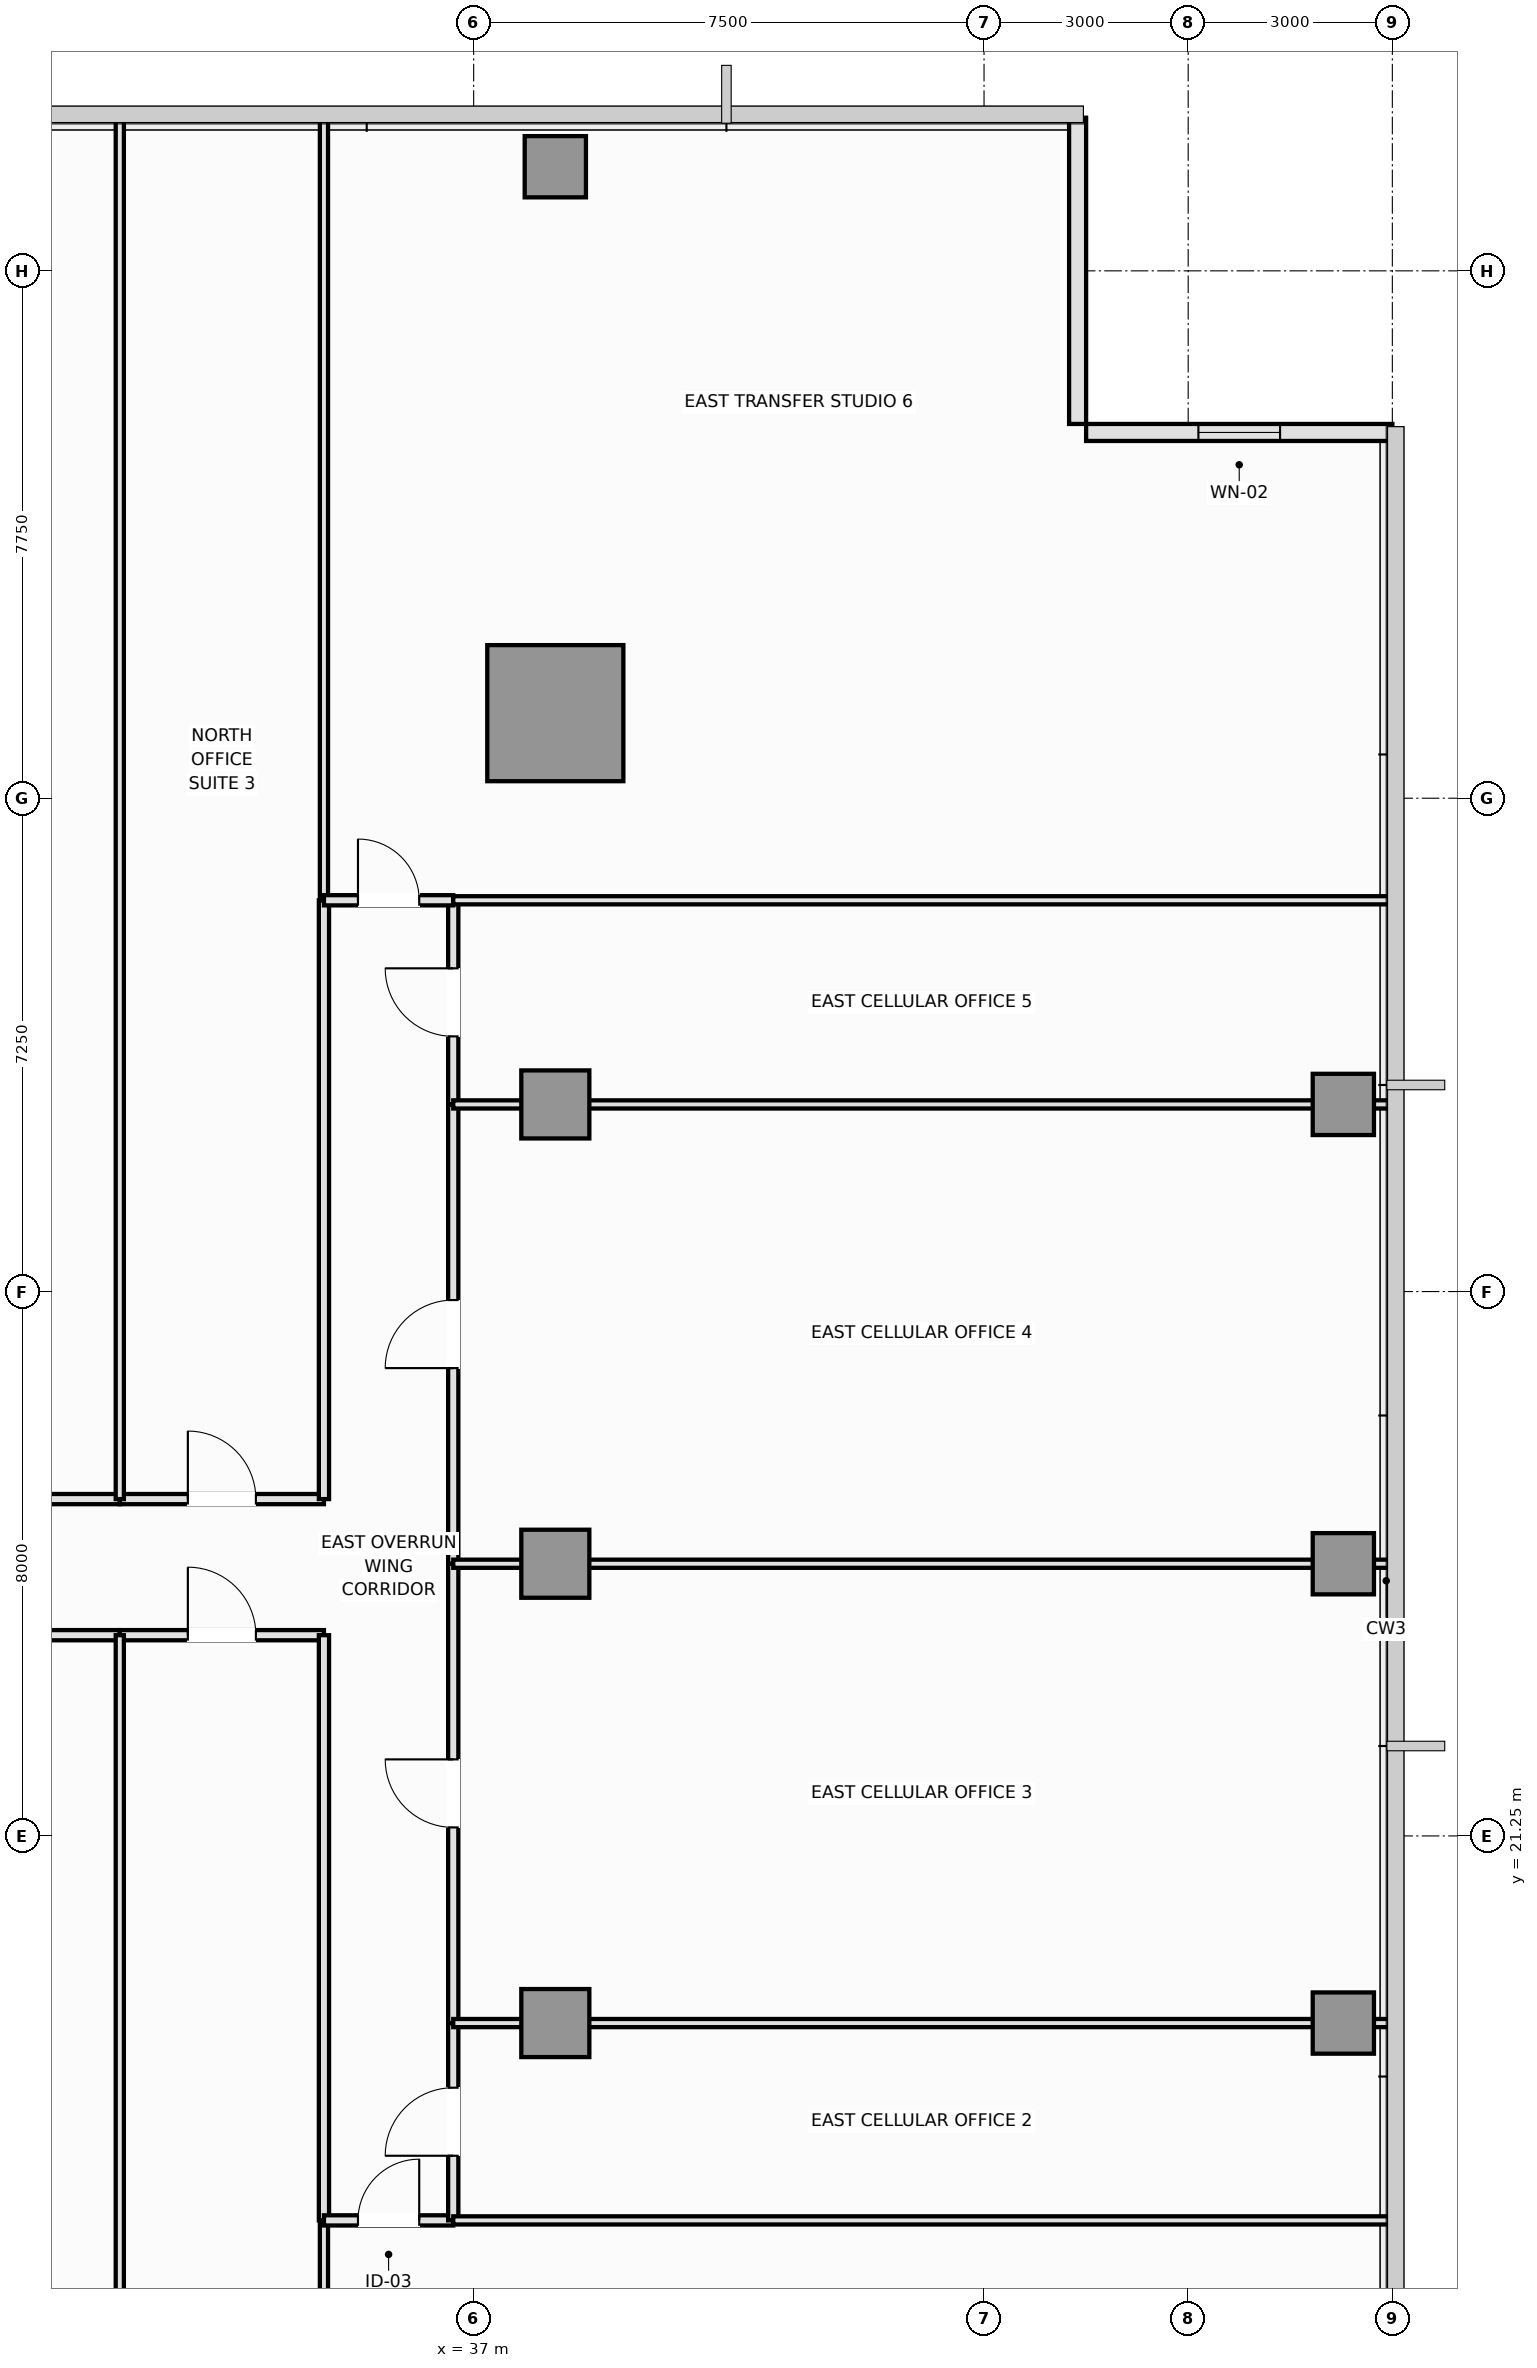
"""IFC4 building model, lengths in metres.
Left out: names, types, materials, properties, quantities, classifications, styles, units other than length and angle.
Written with IfcOpenShell. Run it as: python <this file> out.ifc"""

import sys

from ifc_helpers import new_model, si_unit, direction, frame, frame_2d, origin, origin_2d, place, context, subcontext, project, spatial, rectangle, extrude, element, fill, save


model = new_model("IFC4")
c1 = context("Model", 3, precision=1e-05, world=origin(), true_north=direction((0.0, 1.0)))
c2 = subcontext(c1, "Body", "Model", "MODEL_VIEW")
j1 = project(units=[si_unit("LENGTHUNIT", "METRE"), si_unit("PLANEANGLEUNIT", "RADIAN")], contexts=[c1])
p1 = place(None, origin())
s1 = spatial("IfcSite", under=j1, at=p1, CompositionType="ELEMENT")
p2 = place(p1, origin())
s2 = spatial("IfcBuilding", under=s1, at=p2, CompositionType="ELEMENT")
p3 = place(p2, frame((0.0, 0.0, 102.25)))
s3 = spatial("IfcBuildingStorey", under=s2, at=p3, CompositionType="ELEMENT", Elevation=102.25)
p4 = place(p3, frame((38.2, 37.75, 0.0), z_axis=(0.0, 0.0, 1.0), x_axis=(1.0, 0.0, 0.0)))
e1 = element("IfcColumn", 1, at=p4, inside=s3, PredefinedType="COLUMN", context=c2, shape_type="SweptSolid", body=[
    extrude(rectangle(XDim=2.0, YDim=2.0, at=origin_2d()), origin(), (0.0, 0.0, 1.0), 3.55),
])
for number, where, z_axis, x_axis in (
    (2, (38.2, 18.5, 0.0), (0.0, 0.0, 1.0), (1.0, 0.0, 0.0)),
    (3, (38.2, 25.25, 0.0), (0.0, 0.0, 1.0), (1.0, 0.0, 0.0)),
    (4, (38.2, 32.0, 0.0), (0.0, 0.0, 1.0), (1.0, 0.0, 0.0)),
):
    element("IfcColumn", number, at=place(p3, frame(where, z_axis=z_axis, x_axis=x_axis)), inside=s3, PredefinedType="COLUMN", context=c2, shape_type="SweptSolid", body=[
        extrude(rectangle(XDim=1.0, YDim=1.0, at=origin_2d()), origin(), (0.0, 0.0, 1.0), 3.55),
    ])
for number, where, z_axis, x_axis in (
    (5, (49.78, 18.5, 0.0), (0.0, 0.0, 1.0), (1.0, 0.0, 0.0)),
    (6, (49.78, 25.25, 0.0), (0.0, 0.0, 1.0), (1.0, 0.0, 0.0)),
    (7, (49.78, 32.0, 0.0), (0.0, 0.0, 1.0), (1.0, 0.0, 0.0)),
    (8, (38.2, 45.78, 0.0), (0.0, 0.0, 1.0), (1.0, 0.0, 0.0)),
):
    element("IfcColumn", number, at=place(p3, frame(where, z_axis=z_axis, x_axis=x_axis)), inside=s3, PredefinedType="COLUMN", context=c2, shape_type="SweptSolid", body=[
        extrude(rectangle(XDim=0.9, YDim=0.9, at=origin_2d()), origin(), (0.0, 0.0, 1.0), 3.55),
    ])
p5 = place(p3, frame((50.5, 41.875, 0.0), z_axis=(0.0, 0.0, 1.0), x_axis=(-1.0, 0.0, 0.0)))
e9 = element("IfcWall", 9, at=p5, inside=s3, PredefinedType="SOLIDWALL", context=c2, shape_type="SweptSolid", body=[
    extrude(rectangle(XDim=4.5, YDim=0.25, at=frame_2d((2.25, 0.0))), origin(), (0.0, 0.0, 1.0), 3.37),
])
p6 = place(p5, frame((1.65, 0.0, 0.9)))
e10 = element("IfcOpeningElement", 10, at=p6, cuts=e9, PredefinedType="OPENING", context=c2, shape_type="SweptSolid", body=[
    extrude(rectangle(XDim=1.2, YDim=1.8, at=frame_2d((0.6, 0.9))), frame((0.0, 0.135, 0.0), z_axis=(0.0, -1.0, 0.0), x_axis=(1.0, 0.0, 0.0)), (0.0, 0.0, 1.0), 0.27),
])
p7 = place(p3, frame((45.875, 42.0, 0.0), z_axis=(0.0, 0.0, 1.0), x_axis=(0.0, 1.0, 0.0)))
e11 = element("IfcWall", 11, at=p7, inside=s3, PredefinedType="SOLIDWALL", context=c2, shape_type="SweptSolid", body=[
    extrude(rectangle(XDim=4.5, YDim=0.25, at=frame_2d((2.25, 0.0))), origin(), (0.0, 0.0, 1.0), 3.37),
])
p8 = place(p3, frame((27.5, 24.2, 0.0), z_axis=(0.0, 0.0, 1.0), x_axis=(1.0, 0.0, 0.0)))
e12 = element("IfcWall", 12, at=p8, inside=s3, PredefinedType="PARTITIONING", context=c2, shape_type="SweptSolid", body=[
    extrude(rectangle(XDim=4.3, YDim=0.15, at=frame_2d((2.15, 0.0))), origin(), (0.0, 0.0, 1.0), 3.37),
])
p9 = place(p8, frame((1.65, 0.0, 0.0)))
e13 = element("IfcOpeningElement", 13, at=p9, cuts=e12, PredefinedType="OPENING", context=c2, shape_type="SweptSolid", body=[
    extrude(rectangle(XDim=1.0, YDim=2.15, at=frame_2d((0.5, 1.075))), frame((0.0, 0.085, 0.0), z_axis=(0.0, -1.0, 0.0), x_axis=(1.0, 0.0, 0.0)), (0.0, 0.0, 1.0), 0.17),
])
p10 = place(p3, frame((31.8, 24.2, 0.0), z_axis=(0.0, 0.0, 1.0), x_axis=(1.0, 0.0, 0.0)))
e14 = element("IfcWall", 14, at=p10, inside=s3, PredefinedType="PARTITIONING", context=c2, shape_type="SweptSolid", body=[
    extrude(rectangle(XDim=3.0, YDim=0.15, at=frame_2d((1.5, 0.0))), origin(), (0.0, 0.0, 1.0), 3.37),
])
p11 = place(p10, frame((1.0, 0.0, 0.0)))
e15 = element("IfcOpeningElement", 15, at=p11, cuts=e14, PredefinedType="OPENING", context=c2, shape_type="SweptSolid", body=[
    extrude(rectangle(XDim=1.0, YDim=2.15, at=frame_2d((0.5, 1.075))), frame((0.0, 0.085, 0.0), z_axis=(0.0, -1.0, 0.0), x_axis=(1.0, 0.0, 0.0)), (0.0, 0.0, 1.0), 0.17),
])
p12 = place(p3, frame((27.5, 26.2, 0.0), z_axis=(0.0, 0.0, 1.0), x_axis=(1.0, 0.0, 0.0)))
e16 = element("IfcWall", 16, at=p12, inside=s3, PredefinedType="PARTITIONING", context=c2, shape_type="SweptSolid", body=[
    extrude(rectangle(XDim=4.3, YDim=0.15, at=frame_2d((2.15, 0.0))), origin(), (0.0, 0.0, 1.0), 3.37),
])
p13 = place(p12, frame((1.65, 0.0, 0.0)))
e17 = element("IfcOpeningElement", 17, at=p13, cuts=e16, PredefinedType="OPENING", context=c2, shape_type="SweptSolid", body=[
    extrude(rectangle(XDim=1.0, YDim=2.15, at=frame_2d((0.5, 1.075))), frame((0.0, 0.085, 0.0), z_axis=(0.0, -1.0, 0.0), x_axis=(1.0, 0.0, 0.0)), (0.0, 0.0, 1.0), 0.17),
])
p14 = place(p3, frame((31.8, 26.2, 0.0), z_axis=(0.0, 0.0, 1.0), x_axis=(1.0, 0.0, 0.0)))
e18 = element("IfcWall", 18, at=p14, inside=s3, PredefinedType="PARTITIONING", context=c2, shape_type="SweptSolid", body=[
    extrude(rectangle(XDim=3.0, YDim=0.15, at=frame_2d((1.5, 0.0))), origin(), (0.0, 0.0, 1.0), 3.37),
])
p15 = place(p14, frame((1.0, 0.0, 0.0)))
e19 = element("IfcOpeningElement", 19, at=p15, cuts=e18, PredefinedType="OPENING", context=c2, shape_type="SweptSolid", body=[
    extrude(rectangle(XDim=1.0, YDim=2.15, at=frame_2d((0.5, 1.075))), frame((0.0, 0.085, 0.0), z_axis=(0.0, -1.0, 0.0), x_axis=(1.0, 0.0, 0.0)), (0.0, 0.0, 1.0), 0.17),
])
p16 = place(p3, frame((31.8, 3.51, 0.0), z_axis=(0.0, 0.0, 1.0), x_axis=(0.0, 1.0, 0.0)))
e20 = element("IfcWall", 20, at=p16, inside=s3, PredefinedType="PARTITIONING", context=c2, shape_type="SweptSolid", body=[
    extrude(rectangle(XDim=20.69, YDim=0.12, at=frame_2d((10.345, 0.0))), origin(), (0.0, 0.0, 1.0), 3.37),
])
p17 = place(p3, frame((34.8, 15.6, 0.0), z_axis=(0.0, 0.0, 1.0), x_axis=(0.0, 1.0, 0.0)))
e21 = element("IfcWall", 21, at=p17, inside=s3, PredefinedType="PARTITIONING", context=c2, shape_type="SweptSolid", body=[
    extrude(rectangle(XDim=8.6, YDim=0.15, at=frame_2d((4.3, 0.0))), origin(), (0.0, 0.0, 1.0), 3.37),
])
p18 = place(p3, frame((34.8, 3.51, 0.0), z_axis=(0.0, 0.0, 1.0), x_axis=(0.0, 1.0, 0.0)))
e22 = element("IfcWall", 22, at=p18, inside=s3, PredefinedType="PARTITIONING", context=c2, shape_type="SweptSolid", body=[
    extrude(rectangle(XDim=12.09, YDim=0.12, at=frame_2d((6.045, 0.0))), origin(), (0.0, 0.0, 1.0), 3.37),
])
p19 = place(p3, frame((31.8, 26.2, 0.0), z_axis=(0.0, 0.0, 1.0), x_axis=(0.0, 1.0, 0.0)))
e23 = element("IfcWall", 23, at=p19, inside=s3, PredefinedType="PARTITIONING", context=c2, shape_type="SweptSolid", body=[
    extrude(rectangle(XDim=20.29, YDim=0.12, at=frame_2d((10.145, 0.0))), origin(), (0.0, 0.0, 1.0), 3.37),
])
p20 = place(p3, frame((34.8, 26.2, 0.0), z_axis=(0.0, 0.0, 1.0), x_axis=(0.0, 1.0, 0.0)))
e24 = element("IfcWall", 24, at=p20, inside=s3, PredefinedType="PARTITIONING", context=c2, shape_type="SweptSolid", body=[
    extrude(rectangle(XDim=8.8, YDim=0.15, at=frame_2d((4.4, 0.0))), origin(), (0.0, 0.0, 1.0), 3.37),
])
p21 = place(p3, frame((34.8, 35.0, 0.0), z_axis=(0.0, 0.0, 1.0), x_axis=(0.0, 1.0, 0.0)))
e25 = element("IfcWall", 25, at=p21, inside=s3, PredefinedType="PARTITIONING", context=c2, shape_type="SweptSolid", body=[
    extrude(rectangle(XDim=11.49, YDim=0.12, at=frame_2d((5.745, 0.0))), origin(), (0.0, 0.0, 1.0), 3.37),
])
p22 = place(p3, frame((34.8, 15.6, 0.0), z_axis=(0.0, 0.0, 1.0), x_axis=(1.0, 0.0, 0.0)))
e26 = element("IfcWall", 26, at=p22, inside=s3, PredefinedType="PARTITIONING", context=c2, shape_type="SweptSolid", body=[
    extrude(rectangle(XDim=1.9, YDim=0.15, at=frame_2d((0.95, 0.0))), origin(), (0.0, 0.0, 1.0), 3.37),
])
p23 = place(p22, frame((0.5, 0.0, 0.0)))
e27 = element("IfcOpeningElement", 27, at=p23, cuts=e26, PredefinedType="OPENING", context=c2, shape_type="SweptSolid", body=[
    extrude(rectangle(XDim=0.9, YDim=2.1, at=frame_2d((0.45, 1.05))), frame((0.0, 0.085, 0.0), z_axis=(0.0, -1.0, 0.0), x_axis=(1.0, 0.0, 0.0)), (0.0, 0.0, 1.0), 0.17),
])
p24 = place(p3, frame((36.7, 15.6, 0.0), z_axis=(0.0, 0.0, 1.0), x_axis=(0.0, 1.0, 0.0)))
e28 = element("IfcWall", 28, at=p24, inside=s3, PredefinedType="PARTITIONING", context=c2, shape_type="SweptSolid", body=[
    extrude(rectangle(XDim=2.9, YDim=0.15, at=frame_2d((1.45, 0.0))), origin(), (0.0, 0.0, 1.0), 3.37),
])
p25 = place(p24, frame((0.95, 0.0, 0.0)))
e29 = element("IfcOpeningElement", 29, at=p25, cuts=e28, PredefinedType="OPENING", context=c2, shape_type="SweptSolid", body=[
    extrude(rectangle(XDim=1.0, YDim=2.15, at=frame_2d((0.5, 1.075))), frame((0.0, 0.085, 0.0), z_axis=(0.0, -1.0, 0.0), x_axis=(1.0, 0.0, 0.0)), (0.0, 0.0, 1.0), 0.17),
])
p26 = place(p3, frame((36.7, 18.5, 0.0), z_axis=(0.0, 0.0, 1.0), x_axis=(0.0, 1.0, 0.0)))
e30 = element("IfcWall", 30, at=p26, inside=s3, PredefinedType="PARTITIONING", context=c2, shape_type="SweptSolid", body=[
    extrude(rectangle(XDim=6.75, YDim=0.15, at=frame_2d((3.375, 0.0))), origin(), (0.0, 0.0, 1.0), 3.37),
])
p27 = place(p26, frame((2.875, 0.0, 0.0)))
e31 = element("IfcOpeningElement", 31, at=p27, cuts=e30, PredefinedType="OPENING", context=c2, shape_type="SweptSolid", body=[
    extrude(rectangle(XDim=1.0, YDim=2.15, at=frame_2d((0.5, 1.075))), frame((0.0, 0.085, 0.0), z_axis=(0.0, -1.0, 0.0), x_axis=(1.0, 0.0, 0.0)), (0.0, 0.0, 1.0), 0.17),
])
p28 = place(p3, frame((36.7, 25.25, 0.0), z_axis=(0.0, 0.0, 1.0), x_axis=(0.0, 1.0, 0.0)))
e32 = element("IfcWall", 32, at=p28, inside=s3, PredefinedType="PARTITIONING", context=c2, shape_type="SweptSolid", body=[
    extrude(rectangle(XDim=6.75, YDim=0.15, at=frame_2d((3.375, 0.0))), origin(), (0.0, 0.0, 1.0), 3.37),
])
p29 = place(p28, frame((2.875, 0.0, 0.0)))
e33 = element("IfcOpeningElement", 33, at=p29, cuts=e32, PredefinedType="OPENING", context=c2, shape_type="SweptSolid", body=[
    extrude(rectangle(XDim=1.0, YDim=2.15, at=frame_2d((0.5, 1.075))), frame((0.0, 0.085, 0.0), z_axis=(0.0, -1.0, 0.0), x_axis=(1.0, 0.0, 0.0)), (0.0, 0.0, 1.0), 0.17),
])
p30 = place(p3, frame((36.7, 32.0, 0.0), z_axis=(0.0, 0.0, 1.0), x_axis=(0.0, 1.0, 0.0)))
e34 = element("IfcWall", 34, at=p30, inside=s3, PredefinedType="PARTITIONING", context=c2, shape_type="SweptSolid", body=[
    extrude(rectangle(XDim=3.0, YDim=0.15, at=frame_2d((1.5, 0.0))), origin(), (0.0, 0.0, 1.0), 3.37),
])
p31 = place(p30, frame((1.0, 0.0, 0.0)))
e35 = element("IfcOpeningElement", 35, at=p31, cuts=e34, PredefinedType="OPENING", context=c2, shape_type="SweptSolid", body=[
    extrude(rectangle(XDim=1.0, YDim=2.15, at=frame_2d((0.5, 1.075))), frame((0.0, 0.085, 0.0), z_axis=(0.0, -1.0, 0.0), x_axis=(1.0, 0.0, 0.0)), (0.0, 0.0, 1.0), 0.17),
])
p32 = place(p3, frame((34.8, 35.0, 0.0), z_axis=(0.0, 0.0, 1.0), x_axis=(1.0, 0.0, 0.0)))
e36 = element("IfcWall", 36, at=p32, inside=s3, PredefinedType="PARTITIONING", context=c2, shape_type="SweptSolid", body=[
    extrude(rectangle(XDim=1.9, YDim=0.15, at=frame_2d((0.95, 0.0))), origin(), (0.0, 0.0, 1.0), 3.37),
])
p33 = place(p32, frame((0.5, 0.0, 0.0)))
e37 = element("IfcOpeningElement", 37, at=p33, cuts=e36, PredefinedType="OPENING", context=c2, shape_type="SweptSolid", body=[
    extrude(rectangle(XDim=0.9, YDim=2.1, at=frame_2d((0.45, 1.05))), frame((0.0, 0.085, 0.0), z_axis=(0.0, -1.0, 0.0), x_axis=(1.0, 0.0, 0.0)), (0.0, 0.0, 1.0), 0.17),
])
p34 = place(p3, frame((36.7, 15.6, 0.0), z_axis=(0.0, 0.0, 1.0), x_axis=(1.0, 0.0, 0.0)))
e38 = element("IfcWall", 38, at=p34, inside=s3, PredefinedType="PARTITIONING", context=c2, shape_type="SweptSolid", body=[
    extrude(rectangle(XDim=13.79, YDim=0.12, at=frame_2d((6.895, 0.0))), origin(), (0.0, 0.0, 1.0), 3.37),
])
for number, where, z_axis, x_axis in (
    (39, (36.7, 18.5, 0.0), (0.0, 0.0, 1.0), (1.0, 0.0, 0.0)),
    (40, (36.7, 25.25, 0.0), (0.0, 0.0, 1.0), (1.0, 0.0, 0.0)),
    (41, (36.7, 32.0, 0.0), (0.0, 0.0, 1.0), (1.0, 0.0, 0.0)),
):
    element("IfcWall", number, at=place(p3, frame(where, z_axis=z_axis, x_axis=x_axis)), inside=s3, PredefinedType="PARTITIONING", context=c2, shape_type="SweptSolid", body=[
        extrude(rectangle(XDim=13.79, YDim=0.12, at=frame_2d((6.895, 0.0))), origin(), (0.0, 0.0, 1.0), 2.77),
    ])
p35 = place(p3, frame((36.7, 35.0, 0.0), z_axis=(0.0, 0.0, 1.0), x_axis=(1.0, 0.0, 0.0)))
e42 = element("IfcWall", 42, at=p35, inside=s3, PredefinedType="PARTITIONING", context=c2, shape_type="SweptSolid", body=[
    extrude(rectangle(XDim=13.79, YDim=0.12, at=frame_2d((6.895, 0.0))), origin(), (0.0, 0.0, 1.0), 3.37),
])
p36 = place(p6, origin())
e43 = element("IfcWindow", 43, at=p36, inside=s3, PartitioningType="SINGLE_PANEL", PredefinedType="WINDOW", context=c2, shape_type="SweptSolid", body=[
    extrude(rectangle(XDim=1.2, YDim=1.8, at=frame_2d((0.6, 0.9))), frame((0.0, 0.03, 0.0), z_axis=(0.0, -1.0, 0.0), x_axis=(1.0, 0.0, 0.0)), (0.0, 0.0, 1.0), 0.06),
])
fill(e10, e43)
p37 = place(p11, origin())
e44 = element("IfcDoor", 44, at=p37, inside=s3, OperationType="SINGLE_SWING_LEFT", PredefinedType="DOOR", context=c2, shape_type="SweptSolid", body=[
    extrude(rectangle(XDim=1.0, YDim=2.15, at=frame_2d((0.5, 1.075))), frame((0.0, 0.025, 0.0), z_axis=(0.0, -1.0, 0.0), x_axis=(1.0, 0.0, 0.0)), (0.0, 0.0, 1.0), 0.05),
])
fill(e15, e44)
p38 = place(p15, origin())
e45 = element("IfcDoor", 45, at=p38, inside=s3, OperationType="SINGLE_SWING_LEFT", PredefinedType="DOOR", context=c2, shape_type="SweptSolid", body=[
    extrude(rectangle(XDim=1.0, YDim=2.15, at=frame_2d((0.5, 1.075))), frame((0.0, 0.025, 0.0), z_axis=(0.0, -1.0, 0.0), x_axis=(1.0, 0.0, 0.0)), (0.0, 0.0, 1.0), 0.05),
])
fill(e19, e45)
p39 = place(p23, origin())
e46 = element("IfcDoor", 46, at=p39, inside=s3, OperationType="SINGLE_SWING_RIGHT", PredefinedType="DOOR", context=c2, shape_type="SweptSolid", body=[
    extrude(rectangle(XDim=0.9, YDim=2.1, at=frame_2d((0.45, 1.05))), frame((0.0, 0.025, 0.0), z_axis=(0.0, -1.0, 0.0), x_axis=(1.0, 0.0, 0.0)), (0.0, 0.0, 1.0), 0.05),
])
fill(e27, e46)
p40 = place(p25, origin())
e47 = element("IfcDoor", 47, at=p40, inside=s3, OperationType="SINGLE_SWING_LEFT", PredefinedType="DOOR", context=c2, shape_type="SweptSolid", body=[
    extrude(rectangle(XDim=1.0, YDim=2.15, at=frame_2d((0.5, 1.075))), frame((0.0, 0.025, 0.0), z_axis=(0.0, -1.0, 0.0), x_axis=(1.0, 0.0, 0.0)), (0.0, 0.0, 1.0), 0.05),
])
fill(e29, e47)
p41 = place(p27, origin())
e48 = element("IfcDoor", 48, at=p41, inside=s3, OperationType="SINGLE_SWING_RIGHT", PredefinedType="DOOR", context=c2, shape_type="SweptSolid", body=[
    extrude(rectangle(XDim=1.0, YDim=2.15, at=frame_2d((0.5, 1.075))), frame((0.0, 0.025, 0.0), z_axis=(0.0, -1.0, 0.0), x_axis=(1.0, 0.0, 0.0)), (0.0, 0.0, 1.0), 0.05),
])
fill(e31, e48)
p42 = place(p29, origin())
e49 = element("IfcDoor", 49, at=p42, inside=s3, OperationType="SINGLE_SWING_LEFT", PredefinedType="DOOR", context=c2, shape_type="SweptSolid", body=[
    extrude(rectangle(XDim=1.0, YDim=2.15, at=frame_2d((0.5, 1.075))), frame((0.0, 0.025, 0.0), z_axis=(0.0, -1.0, 0.0), x_axis=(1.0, 0.0, 0.0)), (0.0, 0.0, 1.0), 0.05),
])
fill(e33, e49)
p43 = place(p31, origin())
e50 = element("IfcDoor", 50, at=p43, inside=s3, OperationType="SINGLE_SWING_RIGHT", PredefinedType="DOOR", context=c2, shape_type="SweptSolid", body=[
    extrude(rectangle(XDim=1.0, YDim=2.15, at=frame_2d((0.5, 1.075))), frame((0.0, 0.025, 0.0), z_axis=(0.0, -1.0, 0.0), x_axis=(1.0, 0.0, 0.0)), (0.0, 0.0, 1.0), 0.05),
])
fill(e35, e50)
p44 = place(p33, origin())
e51 = element("IfcDoor", 51, at=p44, inside=s3, OperationType="SINGLE_SWING_LEFT", PredefinedType="DOOR", context=c2, shape_type="SweptSolid", body=[
    extrude(rectangle(XDim=0.9, YDim=2.1, at=frame_2d((0.45, 1.05))), frame((0.0, 0.025, 0.0), z_axis=(0.0, -1.0, 0.0), x_axis=(1.0, 0.0, 0.0)), (0.0, 0.0, 1.0), 0.05),
])
fill(e37, e51)
save(model, sys.argv[1])
